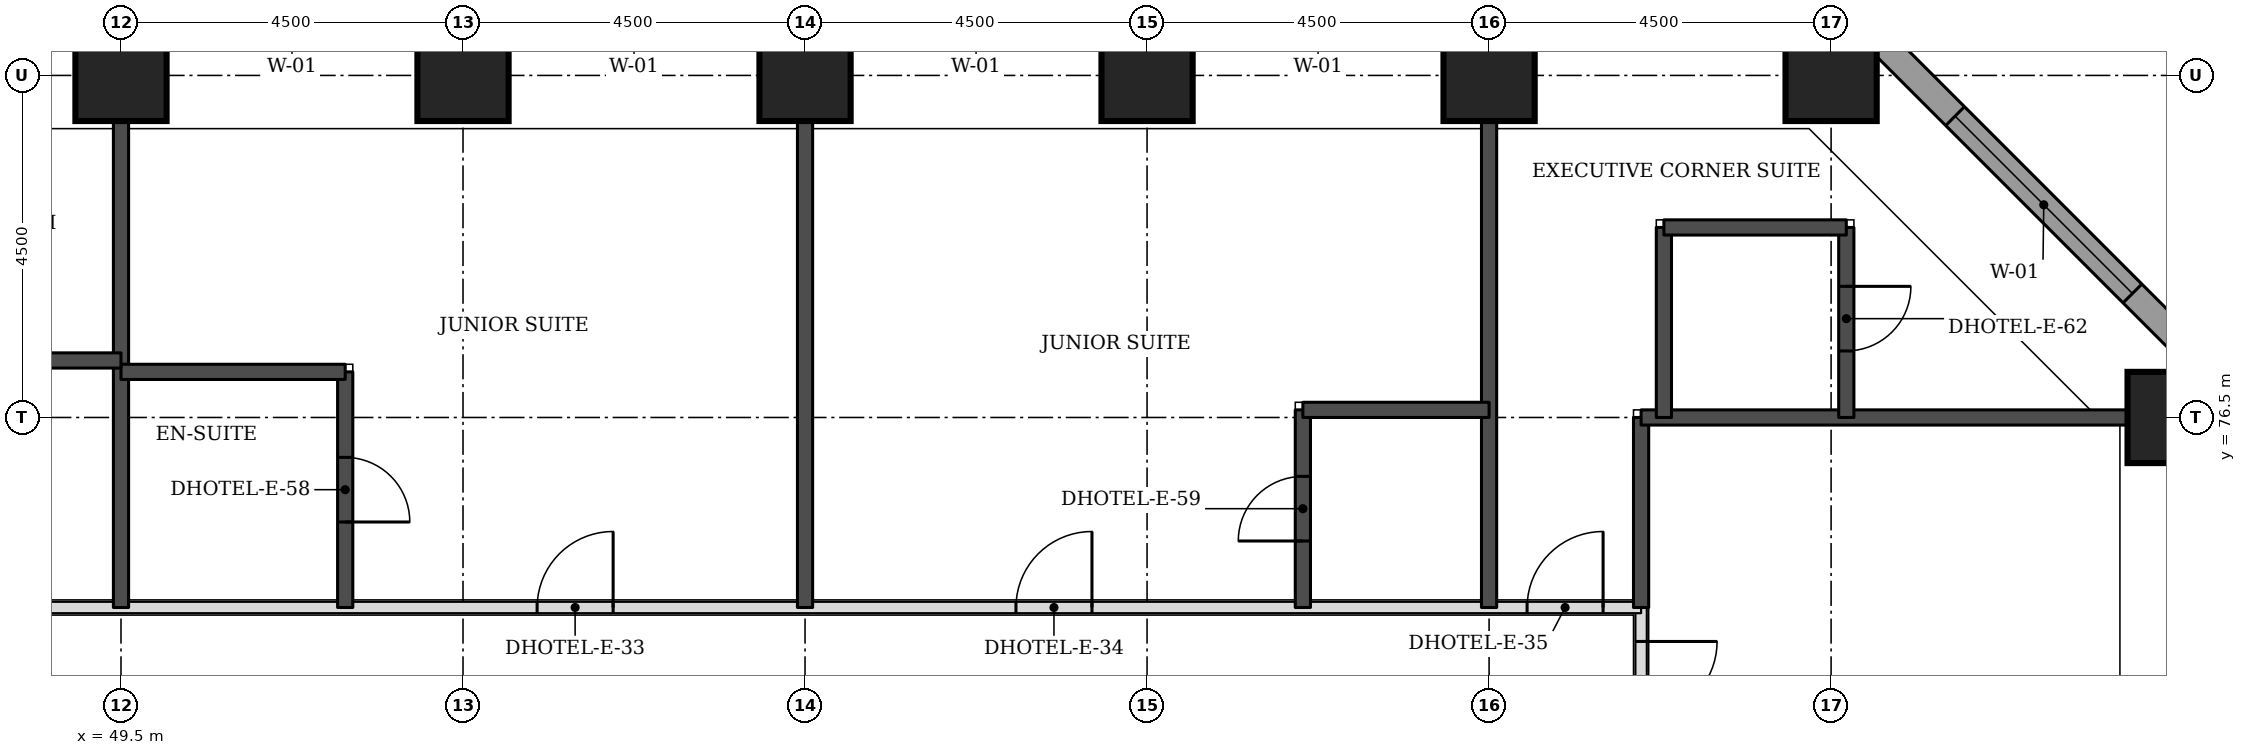
"""IFC4 building model, lengths in metres.
Left out: names, types, materials, properties, quantities, classifications, styles, units other than length and angle.
Written with IfcOpenShell. Run it as: python <this file> out.ifc"""

import sys

from ifc_helpers import new_model, si_unit, direction, frame, frame_2d, origin, origin_2d, place, context, subcontext, project, spatial, rectangle, extrude, element, fill, save


model = new_model("IFC4")
c1 = context("Model", 3, precision=1e-05, world=origin(), true_north=direction((0.0, 1.0)))
c2 = subcontext(c1, "Body", "Model", "MODEL_VIEW")
j1 = project(units=[si_unit("LENGTHUNIT", "METRE"), si_unit("PLANEANGLEUNIT", "RADIAN")], contexts=[c1])
p1 = place(None, origin())
s1 = spatial("IfcSite", under=j1, at=p1, CompositionType="ELEMENT")
p2 = place(p1, origin())
s2 = spatial("IfcBuilding", under=s1, at=p2, CompositionType="ELEMENT")
p3 = place(p2, frame((0.0, 0.0, 62.7)))
s3 = spatial("IfcBuildingStorey", under=s2, at=p3, CompositionType="ELEMENT", Elevation=62.7)
for number, where, z_axis, x_axis in (
    (1, (76.5, 76.5, 0.0), (0.0, 0.0, 1.0), (1.0, 0.0, 0.0)),
    (2, (49.5, 81.0, 0.0), (0.0, 0.0, 1.0), (1.0, 0.0, 0.0)),
    (3, (54.0, 81.0, 0.0), (0.0, 0.0, 1.0), (1.0, 0.0, 0.0)),
    (4, (58.5, 81.0, 0.0), (0.0, 0.0, 1.0), (1.0, 0.0, 0.0)),
    (5, (63.0, 81.0, 0.0), (0.0, 0.0, 1.0), (1.0, 0.0, 0.0)),
    (6, (67.5, 81.0, 0.0), (0.0, 0.0, 1.0), (1.0, 0.0, 0.0)),
    (7, (72.0, 81.0, 0.0), (0.0, 0.0, 1.0), (1.0, 0.0, 0.0)),
):
    element("IfcColumn", number, at=place(p3, frame(where, z_axis=z_axis, x_axis=x_axis)), inside=s3, PredefinedType="COLUMN", context=c2, shape_type="SweptSolid", body=[
        extrude(rectangle(XDim=1.2, YDim=1.2, at=origin_2d()), origin(), (0.0, 0.0, 1.0), 3.3),
    ])
p4 = place(p3, frame((77.326, 76.77, 0.0), z_axis=(0.0, 0.0, 1.0), x_axis=(-0.707106781187, 0.707106781187, 0.0)))
e8 = element("IfcWall", 8, at=p4, inside=s3, PredefinedType="STANDARD", context=c2, shape_type="SweptSolid", body=[
    extrude(rectangle(XDim=7.151, YDim=0.35, at=frame_2d((3.576, 0.0))), origin(), (0.0, 0.0, 1.0), 3.055),
])
p5 = place(p4, frame((1.926, 0.0, 0.8)))
e9 = element("IfcOpeningElement", 9, at=p5, cuts=e8, PredefinedType="OPENING", context=c2, shape_type="SweptSolid", body=[
    extrude(rectangle(XDim=3.3, YDim=1.5, at=frame_2d((1.65, 0.75))), frame((0.0, 0.185, 0.0), z_axis=(0.0, -1.0, 0.0), x_axis=(1.0, 0.0, 0.0)), (0.0, 0.0, 1.0), 0.37),
])
p6 = place(p3, frame((69.5, 47.5, 0.0), z_axis=(0.0, 0.0, 1.0), x_axis=(0.0, 1.0, 0.0)))
e10 = element("IfcWall", 10, at=p6, inside=s3, PredefinedType="PARTITIONING", context=c2, shape_type="SweptSolid", body=[
    extrude(rectangle(XDim=26.5, YDim=0.15, at=frame_2d((13.25, 0.0))), origin(), (0.0, 0.0, 1.0), 3.08),
])
p7 = place(p6, frame((25.053, 0.0, 0.0)))
e11 = element("IfcOpeningElement", 11, at=p7, cuts=e10, PredefinedType="OPENING", context=c2, shape_type="SweptSolid", body=[
    extrude(rectangle(XDim=1.0, YDim=2.1, at=frame_2d((0.5, 1.05))), frame((0.0, 0.085, 0.0), z_axis=(0.0, -1.0, 0.0), x_axis=(1.0, 0.0, 0.0)), (0.0, 0.0, 1.0), 0.17),
])
p8 = place(p6, frame((13.775, 0.0, 0.0)))
e12 = element("IfcOpeningElement", 12, at=p8, cuts=e10, PredefinedType="OPENING", context=c2, shape_type="SweptSolid", body=[
    extrude(rectangle(XDim=1.0, YDim=2.1, at=frame_2d((0.5, 1.05))), frame((0.0, 0.085, 0.0), z_axis=(0.0, -1.0, 0.0), x_axis=(1.0, 0.0, 0.0)), (0.0, 0.0, 1.0), 0.17),
])
p9 = place(p6, frame((7.65, 0.0, 0.0)))
e13 = element("IfcOpeningElement", 13, at=p9, cuts=e10, PredefinedType="OPENING", context=c2, shape_type="SweptSolid", body=[
    extrude(rectangle(XDim=1.1, YDim=2.1, at=frame_2d((0.55, 1.05))), frame((0.0, 0.085, 0.0), z_axis=(0.0, -1.0, 0.0), x_axis=(1.0, 0.0, 0.0)), (0.0, 0.0, 1.0), 0.17),
])
p10 = place(p6, frame((0.447, 0.0, 0.0)))
e14 = element("IfcOpeningElement", 14, at=p10, cuts=e10, PredefinedType="OPENING", context=c2, shape_type="SweptSolid", body=[
    extrude(rectangle(XDim=1.0, YDim=2.1, at=frame_2d((0.5, 1.05))), frame((0.0, 0.085, 0.0), z_axis=(0.0, -1.0, 0.0), x_axis=(1.0, 0.0, 0.0)), (0.0, 0.0, 1.0), 0.17),
])
p11 = place(p3, frame((43.0, 74.0, 0.0), z_axis=(0.0, 0.0, 1.0), x_axis=(1.0, 0.0, 0.0)))
e15 = element("IfcWall", 15, at=p11, inside=s3, PredefinedType="PARTITIONING", context=c2, shape_type="SweptSolid", body=[
    extrude(rectangle(XDim=26.5, YDim=0.15, at=frame_2d((13.25, 0.0))), origin(), (0.0, 0.0, 1.0), 3.08),
])
p12 = place(p11, frame((2.825, 0.0, 0.0)))
e16 = element("IfcOpeningElement", 16, at=p12, cuts=e15, PredefinedType="OPENING", context=c2, shape_type="SweptSolid", body=[
    extrude(rectangle(XDim=1.0, YDim=2.1, at=frame_2d((0.5, 1.05))), frame((0.0, 0.085, 0.0), z_axis=(0.0, -1.0, 0.0), x_axis=(1.0, 0.0, 0.0)), (0.0, 0.0, 1.0), 0.17),
])
p13 = place(p11, frame((11.975, 0.0, 0.0)))
e17 = element("IfcOpeningElement", 17, at=p13, cuts=e15, PredefinedType="OPENING", context=c2, shape_type="SweptSolid", body=[
    extrude(rectangle(XDim=1.0, YDim=2.1, at=frame_2d((0.5, 1.05))), frame((0.0, 0.085, 0.0), z_axis=(0.0, -1.0, 0.0), x_axis=(1.0, 0.0, 0.0)), (0.0, 0.0, 1.0), 0.17),
])
p14 = place(p11, frame((18.275, 0.0, 0.0)))
e18 = element("IfcOpeningElement", 18, at=p14, cuts=e15, PredefinedType="OPENING", context=c2, shape_type="SweptSolid", body=[
    extrude(rectangle(XDim=1.0, YDim=2.1, at=frame_2d((0.5, 1.05))), frame((0.0, 0.085, 0.0), z_axis=(0.0, -1.0, 0.0), x_axis=(1.0, 0.0, 0.0)), (0.0, 0.0, 1.0), 0.17),
])
p15 = place(p11, frame((0.5, 0.0, 0.0)))
e19 = element("IfcOpeningElement", 19, at=p15, cuts=e15, PredefinedType="OPENING", context=c2, shape_type="SweptSolid", body=[
    extrude(rectangle(XDim=1.0, YDim=2.1, at=frame_2d((0.5, 1.05))), frame((0.0, 0.085, 0.0), z_axis=(0.0, -1.0, 0.0), x_axis=(1.0, 0.0, 0.0)), (0.0, 0.0, 1.0), 0.17),
])
p16 = place(p11, frame((25.0, 0.0, 0.0)))
e20 = element("IfcOpeningElement", 20, at=p16, cuts=e15, PredefinedType="OPENING", context=c2, shape_type="SweptSolid", body=[
    extrude(rectangle(XDim=1.0, YDim=2.1, at=frame_2d((0.5, 1.05))), frame((0.0, 0.085, 0.0), z_axis=(0.0, -1.0, 0.0), x_axis=(1.0, 0.0, 0.0)), (0.0, 0.0, 1.0), 0.17),
])
p17 = place(p3, frame((49.5, 74.0, 0.0), z_axis=(0.0, 0.0, 1.0), x_axis=(0.0, 1.0, 0.0)))
e21 = element("IfcWall", 21, at=p17, inside=s3, PredefinedType="SOLIDWALL", context=c2, shape_type="SweptSolid", body=[
    extrude(rectangle(XDim=6.4, YDim=0.2, at=frame_2d((3.2, 0.0))), origin(), (0.0, 0.0, 1.0), 3.08),
])
p18 = place(p3, frame((52.45, 74.0, 0.0), z_axis=(0.0, 0.0, 1.0), x_axis=(0.0, 1.0, 0.0)))
e22 = element("IfcWall", 22, at=p18, inside=s3, PredefinedType="SOLIDWALL", context=c2, shape_type="SweptSolid", body=[
    extrude(rectangle(XDim=3.1, YDim=0.2, at=frame_2d((1.55, 0.0))), origin(), (0.0, 0.0, 1.0), 3.08),
])
p19 = place(p18, frame((1.125, 0.0, 0.0)))
e23 = element("IfcOpeningElement", 23, at=p19, cuts=e22, PredefinedType="OPENING", context=c2, shape_type="SweptSolid", body=[
    extrude(rectangle(XDim=0.85, YDim=2.1, at=frame_2d((0.425, 1.05))), frame((0.0, 0.11, 0.0), z_axis=(0.0, -1.0, 0.0), x_axis=(1.0, 0.0, 0.0)), (0.0, 0.0, 1.0), 0.22),
])
p20 = place(p3, frame((58.5, 74.0, 0.0), z_axis=(0.0, 0.0, 1.0), x_axis=(0.0, 1.0, 0.0)))
e24 = element("IfcWall", 24, at=p20, inside=s3, PredefinedType="SOLIDWALL", context=c2, shape_type="SweptSolid", body=[
    extrude(rectangle(XDim=6.4, YDim=0.2, at=frame_2d((3.2, 0.0))), origin(), (0.0, 0.0, 1.0), 3.08),
])
p21 = place(p3, frame((65.05, 74.0, 0.0), z_axis=(0.0, 0.0, 1.0), x_axis=(0.0, 1.0, 0.0)))
e25 = element("IfcWall", 25, at=p21, inside=s3, PredefinedType="SOLIDWALL", context=c2, shape_type="SweptSolid", body=[
    extrude(rectangle(XDim=2.6, YDim=0.2, at=frame_2d((1.3, 0.0))), origin(), (0.0, 0.0, 1.0), 3.08),
])
p22 = place(p21, frame((0.875, 0.0, 0.0)))
e26 = element("IfcOpeningElement", 26, at=p22, cuts=e25, PredefinedType="OPENING", context=c2, shape_type="SweptSolid", body=[
    extrude(rectangle(XDim=0.85, YDim=2.1, at=frame_2d((0.425, 1.05))), frame((0.0, 0.11, 0.0), z_axis=(0.0, -1.0, 0.0), x_axis=(1.0, 0.0, 0.0)), (0.0, 0.0, 1.0), 0.22),
])
p23 = place(p3, frame((67.5, 74.0, 0.0), z_axis=(0.0, 0.0, 1.0), x_axis=(0.0, 1.0, 0.0)))
e27 = element("IfcWall", 27, at=p23, inside=s3, PredefinedType="SOLIDWALL", context=c2, shape_type="SweptSolid", body=[
    extrude(rectangle(XDim=6.4, YDim=0.2, at=frame_2d((3.2, 0.0))), origin(), (0.0, 0.0, 1.0), 3.08),
])
p24 = place(p3, frame((69.5, 74.0, 0.0), z_axis=(0.0, 0.0, 1.0), x_axis=(0.0, 1.0, 0.0)))
e28 = element("IfcWall", 28, at=p24, inside=s3, PredefinedType="SOLIDWALL", context=c2, shape_type="SweptSolid", body=[
    extrude(rectangle(XDim=2.5, YDim=0.2, at=frame_2d((1.25, 0.0))), origin(), (0.0, 0.0, 1.0), 3.08),
])
p25 = place(p3, frame((69.5, 76.5, 0.0), z_axis=(0.0, 0.0, 1.0), x_axis=(1.0, 0.0, 0.0)))
e29 = element("IfcWall", 29, at=p25, inside=s3, PredefinedType="SOLIDWALL", context=c2, shape_type="SweptSolid", body=[
    extrude(rectangle(XDim=6.4, YDim=0.2, at=frame_2d((3.2, 0.0))), origin(), (0.0, 0.0, 1.0), 3.08),
])
p26 = place(p3, frame((69.8, 76.5, 0.0), z_axis=(0.0, 0.0, 1.0), x_axis=(0.0, 1.0, 0.0)))
e30 = element("IfcWall", 30, at=p26, inside=s3, PredefinedType="SOLIDWALL", context=c2, shape_type="SweptSolid", body=[
    extrude(rectangle(XDim=2.5, YDim=0.2, at=frame_2d((1.25, 0.0))), origin(), (0.0, 0.0, 1.0), 3.08),
])
p27 = place(p3, frame((72.2, 76.5, 0.0), z_axis=(0.0, 0.0, 1.0), x_axis=(0.0, 1.0, 0.0)))
e31 = element("IfcWall", 31, at=p27, inside=s3, PredefinedType="SOLIDWALL", context=c2, shape_type="SweptSolid", body=[
    extrude(rectangle(XDim=2.5, YDim=0.2, at=frame_2d((1.25, 0.0))), origin(), (0.0, 0.0, 1.0), 3.08),
])
p28 = place(p27, frame((0.875, 0.0, 0.0)))
e32 = element("IfcOpeningElement", 32, at=p28, cuts=e31, PredefinedType="OPENING", context=c2, shape_type="SweptSolid", body=[
    extrude(rectangle(XDim=0.85, YDim=2.1, at=frame_2d((0.425, 1.05))), frame((0.0, 0.11, 0.0), z_axis=(0.0, -1.0, 0.0), x_axis=(1.0, 0.0, 0.0)), (0.0, 0.0, 1.0), 0.22),
])
p29 = place(p3, frame((65.05, 76.6, 0.0), z_axis=(0.0, 0.0, 1.0), x_axis=(1.0, 0.0, 0.0)))
e33 = element("IfcWall", 33, at=p29, inside=s3, PredefinedType="SOLIDWALL", context=c2, shape_type="SweptSolid", body=[
    extrude(rectangle(XDim=2.45, YDim=0.2, at=frame_2d((1.225, 0.0))), origin(), (0.0, 0.0, 1.0), 3.08),
])
p30 = place(p3, frame((49.5, 77.1, 0.0), z_axis=(0.0, 0.0, 1.0), x_axis=(1.0, 0.0, 0.0)))
e34 = element("IfcWall", 34, at=p30, inside=s3, PredefinedType="SOLIDWALL", context=c2, shape_type="SweptSolid", body=[
    extrude(rectangle(XDim=2.95, YDim=0.2, at=frame_2d((1.475, 0.0))), origin(), (0.0, 0.0, 1.0), 3.08),
])
p31 = place(p3, frame((47.65, 77.25, 0.0), z_axis=(0.0, 0.0, 1.0), x_axis=(1.0, 0.0, 0.0)))
e35 = element("IfcWall", 35, at=p31, inside=s3, PredefinedType="SOLIDWALL", context=c2, shape_type="SweptSolid", body=[
    extrude(rectangle(XDim=1.85, YDim=0.2, at=frame_2d((0.925, 0.0))), origin(), (0.0, 0.0, 1.0), 3.08),
])
p32 = place(p3, frame((69.8, 79.0, 0.0), z_axis=(0.0, 0.0, 1.0), x_axis=(1.0, 0.0, 0.0)))
e36 = element("IfcWall", 36, at=p32, inside=s3, PredefinedType="SOLIDWALL", context=c2, shape_type="SweptSolid", body=[
    extrude(rectangle(XDim=2.4, YDim=0.2, at=frame_2d((1.2, 0.0))), origin(), (0.0, 0.0, 1.0), 3.08),
])
p33 = place(p5, origin())
e37 = element("IfcWindow", 37, at=p33, inside=s3, PartitioningType="SINGLE_PANEL", PredefinedType="WINDOW", context=c2, shape_type="SweptSolid", body=[
    extrude(rectangle(XDim=3.3, YDim=1.5, at=frame_2d((1.65, 0.75))), frame((0.0, 0.085, 0.0), z_axis=(0.0, -1.0, 0.0), x_axis=(1.0, 0.0, 0.0)), (0.0, 0.0, 1.0), 0.06),
])
fill(e9, e37)
p34 = place(p13, origin())
e38 = element("IfcDoor", 38, at=p34, inside=s3, OperationType="SINGLE_SWING_RIGHT", PredefinedType="DOOR", context=c2, shape_type="SweptSolid", body=[
    extrude(rectangle(XDim=1.0, YDim=2.1, at=frame_2d((0.5, 1.05))), frame((0.0, 0.025, 0.0), z_axis=(0.0, -1.0, 0.0), x_axis=(1.0, 0.0, 0.0)), (0.0, 0.0, 1.0), 0.05),
])
fill(e17, e38)
p35 = place(p19, frame((0.85, 0.0, 0.0), z_axis=(0.0, 0.0, 1.0), x_axis=(-1.0, 0.0, 0.0)))
e39 = element("IfcDoor", 39, at=p35, inside=s3, OperationType="SINGLE_SWING_RIGHT", PredefinedType="DOOR", context=c2, shape_type="SweptSolid", body=[
    extrude(rectangle(XDim=0.85, YDim=2.1, at=frame_2d((0.425, 1.05))), frame((0.0, 0.025, 0.0), z_axis=(0.0, -1.0, 0.0), x_axis=(1.0, 0.0, 0.0)), (0.0, 0.0, 1.0), 0.05),
])
fill(e23, e39)
p36 = place(p14, origin())
e40 = element("IfcDoor", 40, at=p36, inside=s3, OperationType="SINGLE_SWING_RIGHT", PredefinedType="DOOR", context=c2, shape_type="SweptSolid", body=[
    extrude(rectangle(XDim=1.0, YDim=2.1, at=frame_2d((0.5, 1.05))), frame((0.0, 0.025, 0.0), z_axis=(0.0, -1.0, 0.0), x_axis=(1.0, 0.0, 0.0)), (0.0, 0.0, 1.0), 0.05),
])
fill(e18, e40)
p37 = place(p22, origin())
e41 = element("IfcDoor", 41, at=p37, inside=s3, OperationType="SINGLE_SWING_LEFT", PredefinedType="DOOR", context=c2, shape_type="SweptSolid", body=[
    extrude(rectangle(XDim=0.85, YDim=2.1, at=frame_2d((0.425, 1.05))), frame((0.0, 0.025, 0.0), z_axis=(0.0, -1.0, 0.0), x_axis=(1.0, 0.0, 0.0)), (0.0, 0.0, 1.0), 0.05),
])
fill(e26, e41)
p38 = place(p7, frame((1.0, 0.0, 0.0), z_axis=(0.0, 0.0, 1.0), x_axis=(-1.0, 0.0, 0.0)))
e42 = element("IfcDoor", 42, at=p38, inside=s3, OperationType="SINGLE_SWING_LEFT", PredefinedType="DOOR", context=c2, shape_type="SweptSolid", body=[
    extrude(rectangle(XDim=1.0, YDim=2.1, at=frame_2d((0.5, 1.05))), frame((0.0, 0.025, 0.0), z_axis=(0.0, -1.0, 0.0), x_axis=(1.0, 0.0, 0.0)), (0.0, 0.0, 1.0), 0.05),
])
fill(e11, e42)
p39 = place(p16, origin())
e43 = element("IfcDoor", 43, at=p39, inside=s3, OperationType="SINGLE_SWING_RIGHT", PredefinedType="DOOR", context=c2, shape_type="SweptSolid", body=[
    extrude(rectangle(XDim=1.0, YDim=2.1, at=frame_2d((0.5, 1.05))), frame((0.0, 0.025, 0.0), z_axis=(0.0, -1.0, 0.0), x_axis=(1.0, 0.0, 0.0)), (0.0, 0.0, 1.0), 0.05),
])
fill(e20, e43)
p40 = place(p28, frame((0.85, 0.0, 0.0), z_axis=(0.0, 0.0, 1.0), x_axis=(-1.0, 0.0, 0.0)))
e44 = element("IfcDoor", 44, at=p40, inside=s3, OperationType="SINGLE_SWING_LEFT", PredefinedType="DOOR", context=c2, shape_type="SweptSolid", body=[
    extrude(rectangle(XDim=0.85, YDim=2.1, at=frame_2d((0.425, 1.05))), frame((0.0, 0.025, 0.0), z_axis=(0.0, -1.0, 0.0), x_axis=(1.0, 0.0, 0.0)), (0.0, 0.0, 1.0), 0.05),
])
fill(e32, e44)
save(model, sys.argv[1])
